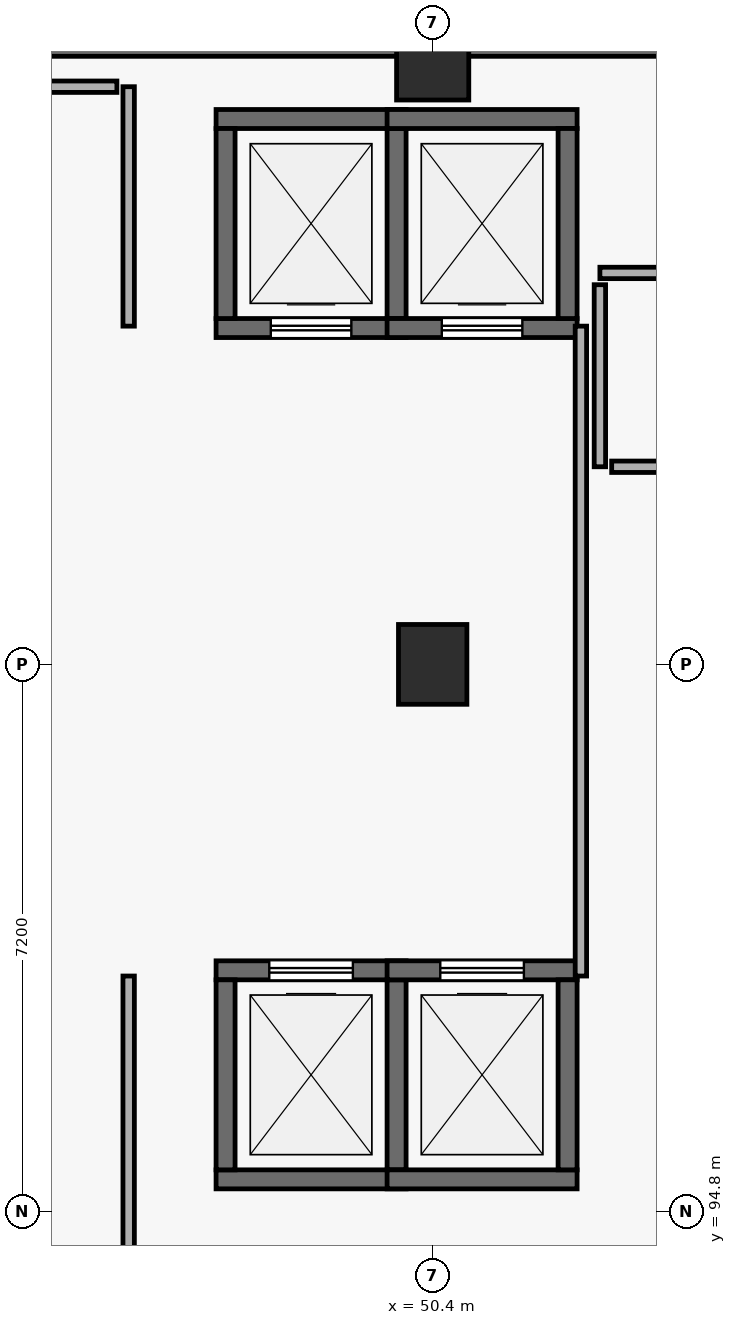
"""IFC4 building model, lengths in metres.
Left out: names, types, materials, properties, quantities, classifications, styles, units other than length and angle.
Written with IfcOpenShell. Run it as: python <this file> out.ifc"""

import sys

from ifc_helpers import new_model, si_unit, direction, frame, frame_2d, origin, origin_2d, place, context, subcontext, project, spatial, rectangle, extrude, element, fill, save


model = new_model("IFC4")
c1 = context("Model", 3, precision=1e-05, world=origin(), true_north=direction((0.0, 1.0)))
c2 = subcontext(c1, "Body", "Model", "MODEL_VIEW")
j1 = project(units=[si_unit("LENGTHUNIT", "METRE"), si_unit("PLANEANGLEUNIT", "RADIAN")], contexts=[c1])
p1 = place(None, origin())
s1 = spatial("IfcSite", under=j1, at=p1, CompositionType="ELEMENT")
p2 = place(p1, origin())
s2 = spatial("IfcBuilding", under=s1, at=p2, CompositionType="ELEMENT")
p3 = place(p2, frame((0.0, 0.0, -4.5)))
s3 = spatial("IfcBuildingStorey", under=s2, at=p3, CompositionType="ELEMENT", Elevation=-4.5)
p4 = place(p3, frame((50.4, 102.0, -0.3), z_axis=(0.0, 0.0, 1.0), x_axis=(1.0, 0.0, 0.0)))
e1 = element("IfcColumn", 1, at=p4, inside=s3, PredefinedType="COLUMN", context=c2, shape_type="SweptSolid", body=[
    extrude(rectangle(XDim=0.9, YDim=1.05, at=origin_2d()), origin(), (0.0, 0.0, 1.0), 4.8),
])
p5 = place(p3, frame((50.4, 109.9, -0.3), z_axis=(0.0, 0.0, 1.0), x_axis=(1.0, 0.0, 0.0)))
e2 = element("IfcColumn", 2, at=p5, inside=s3, PredefinedType="COLUMN", context=c2, shape_type="SweptSolid", body=[
    extrude(rectangle(XDim=0.95, YDim=0.95, at=origin_2d()), origin(), (0.0, 0.0, 1.0), 4.8),
])
p6 = place(p3, frame((33.6, 110.19, 0.0), z_axis=(0.0, 0.0, 1.0), x_axis=(1.0, 0.0, 0.0)))
e3 = element("IfcWall", 3, at=p6, inside=s3, PredefinedType="SOLIDWALL", context=c2, shape_type="SweptSolid", body=[
    extrude(rectangle(XDim=58.8, YDim=0.38, at=frame_2d((29.4, 0.0))), origin(), (0.0, 0.0, 1.0), 4.22),
])
p7 = place(p3, frame((47.55, 95.225, 0.0), z_axis=(0.0, 0.0, 1.0), x_axis=(1.0, 0.0, 0.0)))
e4 = element("IfcWall", 4, at=p7, inside=s3, PredefinedType="SHEAR", context=c2, shape_type="SweptSolid", body=[
    extrude(rectangle(XDim=2.5, YDim=0.25, at=frame_2d((1.25, 0.0))), origin(), (0.0, 0.0, 1.0), 4.22),
])
p8 = place(p3, frame((50.05, 97.975, 0.0), z_axis=(0.0, 0.0, 1.0), x_axis=(-1.0, 0.0, 0.0)))
e5 = element("IfcWall", 5, at=p8, inside=s3, PredefinedType="SHEAR", context=c2, shape_type="SweptSolid", body=[
    extrude(rectangle(XDim=2.5, YDim=0.25, at=frame_2d((1.25, 0.0))), origin(), (0.0, 0.0, 1.0), 4.22),
])
p9 = place(p8, frame((0.7, 0.0, 0.0)))
e6 = element("IfcOpeningElement", 6, at=p9, cuts=e5, PredefinedType="OPENING", context=c2, shape_type="SweptSolid", body=[
    extrude(rectangle(XDim=1.1, YDim=2.2, at=frame_2d((0.55, 1.1))), frame((0.0, 0.135, 0.0), z_axis=(0.0, -1.0, 0.0), x_axis=(1.0, 0.0, 0.0)), (0.0, 0.0, 1.0), 0.27),
])
for number, where, z_axis, x_axis in (
    (7, (47.675, 95.35, 0.0), (0.0, 0.0, 1.0), (0.0, 1.0, 0.0)),
    (8, (49.925, 97.85, 0.0), (0.0, 0.0, 1.0), (0.0, -1.0, 0.0)),
    (9, (49.8, 95.225, 0.0), (0.0, 0.0, 1.0), (1.0, 0.0, 0.0)),
):
    element("IfcWall", number, at=place(p3, frame(where, z_axis=z_axis, x_axis=x_axis)), inside=s3, PredefinedType="SHEAR", context=c2, shape_type="SweptSolid", body=[
        extrude(rectangle(XDim=2.5, YDim=0.25, at=frame_2d((1.25, 0.0))), origin(), (0.0, 0.0, 1.0), 4.22),
    ])
p10 = place(p3, frame((52.3, 97.975, 0.0), z_axis=(0.0, 0.0, 1.0), x_axis=(-1.0, 0.0, 0.0)))
e10 = element("IfcWall", 10, at=p10, inside=s3, PredefinedType="SHEAR", context=c2, shape_type="SweptSolid", body=[
    extrude(rectangle(XDim=2.5, YDim=0.25, at=frame_2d((1.25, 0.0))), origin(), (0.0, 0.0, 1.0), 4.22),
])
p11 = place(p10, frame((0.7, 0.0, 0.0)))
e11 = element("IfcOpeningElement", 11, at=p11, cuts=e10, PredefinedType="OPENING", context=c2, shape_type="SweptSolid", body=[
    extrude(rectangle(XDim=1.1, YDim=2.2, at=frame_2d((0.55, 1.1))), frame((0.0, 0.135, 0.0), z_axis=(0.0, -1.0, 0.0), x_axis=(1.0, 0.0, 0.0)), (0.0, 0.0, 1.0), 0.27),
])
p12 = place(p3, frame((52.175, 97.85, 0.0), z_axis=(0.0, 0.0, 1.0), x_axis=(0.0, -1.0, 0.0)))
e12 = element("IfcWall", 12, at=p12, inside=s3, PredefinedType="SHEAR", context=c2, shape_type="SweptSolid", body=[
    extrude(rectangle(XDim=2.5, YDim=0.25, at=frame_2d((1.25, 0.0))), origin(), (0.0, 0.0, 1.0), 4.22),
])
p13 = place(p3, frame((47.55, 106.425, 0.0), z_axis=(0.0, 0.0, 1.0), x_axis=(1.0, 0.0, 0.0)))
e13 = element("IfcWall", 13, at=p13, inside=s3, PredefinedType="SHEAR", context=c2, shape_type="SweptSolid", body=[
    extrude(rectangle(XDim=2.5, YDim=0.25, at=frame_2d((1.25, 0.0))), origin(), (0.0, 0.0, 1.0), 4.22),
])
p14 = place(p13, frame((0.72, 0.0, 0.0)))
e14 = element("IfcOpeningElement", 14, at=p14, cuts=e13, PredefinedType="OPENING", context=c2, shape_type="SweptSolid", body=[
    extrude(rectangle(XDim=1.06, YDim=2.2, at=frame_2d((0.53, 1.1))), frame((0.0, 0.135, 0.0), z_axis=(0.0, -1.0, 0.0), x_axis=(1.0, 0.0, 0.0)), (0.0, 0.0, 1.0), 0.27),
])
for number, where, z_axis, x_axis in (
    (15, (50.05, 109.175, 0.0), (0.0, 0.0, 1.0), (-1.0, 0.0, 0.0)),
    (16, (47.675, 106.55, 0.0), (0.0, 0.0, 1.0), (0.0, 1.0, 0.0)),
    (17, (49.925, 109.05, 0.0), (0.0, 0.0, 1.0), (0.0, -1.0, 0.0)),
):
    element("IfcWall", number, at=place(p3, frame(where, z_axis=z_axis, x_axis=x_axis)), inside=s3, PredefinedType="SHEAR", context=c2, shape_type="SweptSolid", body=[
        extrude(rectangle(XDim=2.5, YDim=0.25, at=frame_2d((1.25, 0.0))), origin(), (0.0, 0.0, 1.0), 4.22),
    ])
p15 = place(p3, frame((49.8, 106.425, 0.0), z_axis=(0.0, 0.0, 1.0), x_axis=(1.0, 0.0, 0.0)))
e18 = element("IfcWall", 18, at=p15, inside=s3, PredefinedType="SHEAR", context=c2, shape_type="SweptSolid", body=[
    extrude(rectangle(XDim=2.5, YDim=0.25, at=frame_2d((1.25, 0.0))), origin(), (0.0, 0.0, 1.0), 4.22),
])
p16 = place(p15, frame((0.72, 0.0, 0.0)))
e19 = element("IfcOpeningElement", 19, at=p16, cuts=e18, PredefinedType="OPENING", context=c2, shape_type="SweptSolid", body=[
    extrude(rectangle(XDim=1.06, YDim=2.2, at=frame_2d((0.53, 1.1))), frame((0.0, 0.135, 0.0), z_axis=(0.0, -1.0, 0.0), x_axis=(1.0, 0.0, 0.0)), (0.0, 0.0, 1.0), 0.27),
])
for number, where, z_axis, x_axis in (
    (20, (52.3, 109.175, 0.0), (0.0, 0.0, 1.0), (-1.0, 0.0, 0.0)),
    (21, (52.175, 109.05, 0.0), (0.0, 0.0, 1.0), (0.0, -1.0, 0.0)),
):
    element("IfcWall", number, at=place(p3, frame(where, z_axis=z_axis, x_axis=x_axis)), inside=s3, PredefinedType="SHEAR", context=c2, shape_type="SweptSolid", body=[
        extrude(rectangle(XDim=2.5, YDim=0.25, at=frame_2d((1.25, 0.0))), origin(), (0.0, 0.0, 1.0), 4.22),
    ])
p17 = place(p3, frame((52.35, 97.9, 0.0), z_axis=(0.0, 0.0, 1.0), x_axis=(0.0, 1.0, 0.0)))
e22 = element("IfcWall", 22, at=p17, inside=s3, PredefinedType="PARTITIONING", context=c2, shape_type="SweptSolid", body=[
    extrude(rectangle(XDim=8.55, YDim=0.15, at=frame_2d((4.275, 0.0))), origin(), (0.0, 0.0, 1.0), 4.22),
])
p18 = place(p3, frame((60.1, 107.15, 0.0), z_axis=(0.0, 0.0, 1.0), x_axis=(-1.0, 0.0, 0.0)))
e23 = element("IfcWall", 23, at=p18, inside=s3, PredefinedType="PARTITIONING", context=c2, shape_type="SweptSolid", body=[
    extrude(rectangle(XDim=7.5, YDim=0.15, at=frame_2d((3.75, 0.0))), origin(), (0.0, 0.0, 1.0), 4.22),
])
p19 = place(p3, frame((46.4, 94.005, 0.0), z_axis=(0.0, 0.0, 1.0), x_axis=(0.0, 1.0, 0.0)))
e24 = element("IfcWall", 24, at=p19, inside=s3, PredefinedType="PARTITIONING", context=c2, shape_type="SweptSolid", body=[
    extrude(rectangle(XDim=3.895, YDim=0.15, at=frame_2d((1.948, 0.0))), origin(), (0.0, 0.0, 1.0), 4.22),
])
p20 = place(p3, frame((46.4, 106.45, 0.0), z_axis=(0.0, 0.0, 1.0), x_axis=(0.0, 1.0, 0.0)))
e25 = element("IfcWall", 25, at=p20, inside=s3, PredefinedType="PARTITIONING", context=c2, shape_type="SweptSolid", body=[
    extrude(rectangle(XDim=3.15, YDim=0.15, at=frame_2d((1.575, 0.0))), origin(), (0.0, 0.0, 1.0), 4.22),
])
p21 = place(p3, frame((52.6, 106.995, 0.0), z_axis=(0.0, 0.0, 1.0), x_axis=(0.0, -1.0, 0.0)))
e26 = element("IfcWall", 26, at=p21, inside=s3, PredefinedType="PARTITIONING", context=c2, shape_type="SweptSolid", body=[
    extrude(rectangle(XDim=2.395, YDim=0.15, at=frame_2d((1.198, 0.0))), origin(), (0.0, 0.0, 1.0), 4.22),
])
p22 = place(p3, frame((52.755, 104.6, 0.0), z_axis=(0.0, 0.0, 1.0), x_axis=(1.0, 0.0, 0.0)))
e27 = element("IfcWall", 27, at=p22, inside=s3, PredefinedType="PARTITIONING", context=c2, shape_type="SweptSolid", body=[
    extrude(rectangle(XDim=2.325, YDim=0.15, at=frame_2d((1.163, 0.0))), origin(), (0.0, 0.0, 1.0), 4.22),
])
p23 = place(p3, frame((46.245, 109.6, 0.0), z_axis=(0.0, 0.0, 1.0), x_axis=(-1.0, 0.0, 0.0)))
e28 = element("IfcWall", 28, at=p23, inside=s3, PredefinedType="PARTITIONING", context=c2, shape_type="SweptSolid", body=[
    extrude(rectangle(XDim=1.91, YDim=0.15, at=frame_2d((0.955, 0.0))), origin(), (0.0, 0.0, 1.0), 3.46),
])
p24 = place(p9, origin())
e29 = element("IfcDoor", 29, at=p24, inside=s3, OperationType="SLIDING_TO_LEFT", PredefinedType="DOOR", context=c2, shape_type="SweptSolid", body=[
    extrude(rectangle(XDim=1.1, YDim=2.2, at=frame_2d((0.55, 1.1))), frame((0.0, 0.025, 0.0), z_axis=(0.0, -1.0, 0.0), x_axis=(1.0, 0.0, 0.0)), (0.0, 0.0, 1.0), 0.05),
])
fill(e6, e29)
p25 = place(p11, origin())
e30 = element("IfcDoor", 30, at=p25, inside=s3, OperationType="SLIDING_TO_LEFT", PredefinedType="DOOR", context=c2, shape_type="SweptSolid", body=[
    extrude(rectangle(XDim=1.1, YDim=2.2, at=frame_2d((0.55, 1.1))), frame((0.0, 0.025, 0.0), z_axis=(0.0, -1.0, 0.0), x_axis=(1.0, 0.0, 0.0)), (0.0, 0.0, 1.0), 0.05),
])
fill(e11, e30)
p26 = place(p14, origin())
e31 = element("IfcDoor", 31, at=p26, inside=s3, OperationType="SLIDING_TO_LEFT", PredefinedType="DOOR", context=c2, shape_type="SweptSolid", body=[
    extrude(rectangle(XDim=1.06, YDim=2.2, at=frame_2d((0.53, 1.1))), frame((0.0, 0.025, 0.0), z_axis=(0.0, -1.0, 0.0), x_axis=(1.0, 0.0, 0.0)), (0.0, 0.0, 1.0), 0.05),
])
fill(e14, e31)
p27 = place(p16, origin())
e32 = element("IfcDoor", 32, at=p27, inside=s3, OperationType="SLIDING_TO_LEFT", PredefinedType="DOOR", context=c2, shape_type="SweptSolid", body=[
    extrude(rectangle(XDim=1.06, YDim=2.2, at=frame_2d((0.53, 1.1))), frame((0.0, 0.025, 0.0), z_axis=(0.0, -1.0, 0.0), x_axis=(1.0, 0.0, 0.0)), (0.0, 0.0, 1.0), 0.05),
])
fill(e19, e32)
save(model, sys.argv[1])
